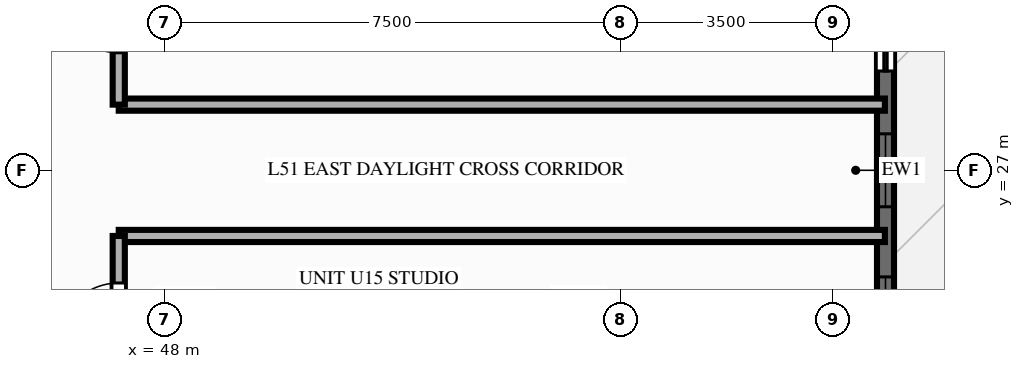
"""IFC4 building model, lengths in metres.
Left out: names, types, materials, properties, quantities, classifications, styles, units other than length and angle.
Written with IfcOpenShell. Run it as: python <this file> out.ifc"""

import sys

from ifc_helpers import new_model, si_unit, direction, frame, frame_2d, origin, place, context, subcontext, project, spatial, rectangle, extrude, source, transform, mapped, element, fill, save


model = new_model("IFC4")
c1 = context("Model", 3, precision=1e-05, world=origin(), true_north=direction((0.0, 1.0)))
c2 = subcontext(c1, "Body", "Model", "MODEL_VIEW")
j1 = project(units=[si_unit("LENGTHUNIT", "METRE"), si_unit("PLANEANGLEUNIT", "RADIAN")], contexts=[c1])
p1 = place(None, origin())
s1 = spatial("IfcSite", under=j1, at=p1, CompositionType="ELEMENT")
p2 = place(p1, origin())
s2 = spatial("IfcBuilding", under=s1, at=p2, CompositionType="ELEMENT")
p3 = place(p2, frame((0.0, 0.0, 163.0)))
s3 = spatial("IfcBuildingStorey", under=s2, at=p3, CompositionType="ELEMENT", Elevation=163.0)
p4 = place(p3, frame((59.86, 11.0, 0.0), z_axis=(0.0, 0.0, 1.0), x_axis=(0.0, 1.0, 0.0)))
e1 = element("IfcWall", 1, at=p4, inside=s3, PredefinedType="SOLIDWALL", context=c2, shape_type="SweptSolid", body=[
    extrude(rectangle(XDim=32.0, YDim=0.28, at=frame_2d((16.0, 0.0))), origin(), (0.0, 0.0, 1.0), 2.28),
])
p5 = place(p4, frame((1.04, 0.0, 0.25)))
e2 = element("IfcOpeningElement", 2, at=p5, cuts=e1, PredefinedType="OPENING", context=c2, shape_type="SweptSolid", body=[
    extrude(rectangle(XDim=1.2, YDim=1.5, at=frame_2d((0.6, 0.75))), frame((0.0, 0.152, 0.0), z_axis=(0.0, -1.0, 0.0), x_axis=(1.0, 0.0, 0.0)), (0.0, 0.0, 1.0), 0.304),
])
p6 = place(p4, frame((3.552, 0.0, 0.25)))
e3 = element("IfcOpeningElement", 3, at=p6, cuts=e1, PredefinedType="OPENING", context=c2, shape_type="SweptSolid", body=[
    extrude(rectangle(XDim=1.2, YDim=1.5, at=frame_2d((0.6, 0.75))), frame((0.0, 0.152, 0.0), z_axis=(0.0, -1.0, 0.0), x_axis=(1.0, 0.0, 0.0)), (0.0, 0.0, 1.0), 0.304),
])
p7 = place(p4, frame((5.662, 0.0, 0.25)))
e4 = element("IfcOpeningElement", 4, at=p7, cuts=e1, PredefinedType="OPENING", context=c2, shape_type="SweptSolid", body=[
    extrude(rectangle(XDim=0.7, YDim=1.5, at=frame_2d((0.35, 0.75))), frame((0.0, 0.152, 0.0), z_axis=(0.0, -1.0, 0.0), x_axis=(1.0, 0.0, 0.0)), (0.0, 0.0, 1.0), 0.304),
])
p8 = place(p4, frame((8.29, 0.0, 0.25)))
e5 = element("IfcOpeningElement", 5, at=p8, cuts=e1, PredefinedType="OPENING", context=c2, shape_type="SweptSolid", body=[
    extrude(rectangle(XDim=1.2, YDim=1.5, at=frame_2d((0.6, 0.75))), frame((0.0, 0.152, 0.0), z_axis=(0.0, -1.0, 0.0), x_axis=(1.0, 0.0, 0.0)), (0.0, 0.0, 1.0), 0.304),
])
p9 = place(p4, frame((10.688, 0.0, 0.25)))
e6 = element("IfcOpeningElement", 6, at=p9, cuts=e1, PredefinedType="OPENING", context=c2, shape_type="SweptSolid", body=[
    extrude(rectangle(XDim=1.2, YDim=1.5, at=frame_2d((0.6, 0.75))), frame((0.0, 0.152, 0.0), z_axis=(0.0, -1.0, 0.0), x_axis=(1.0, 0.0, 0.0)), (0.0, 0.0, 1.0), 0.304),
])
p10 = place(p4, frame((13.046, 0.0, 0.25)))
e7 = element("IfcOpeningElement", 7, at=p10, cuts=e1, PredefinedType="OPENING", context=c2, shape_type="SweptSolid", body=[
    extrude(rectangle(XDim=1.2, YDim=1.5, at=frame_2d((0.6, 0.75))), frame((0.0, 0.152, 0.0), z_axis=(0.0, -1.0, 0.0), x_axis=(1.0, 0.0, 0.0)), (0.0, 0.0, 1.0), 0.304),
])
p11 = place(p4, frame((15.4, 0.0, 0.25)))
e8 = element("IfcOpeningElement", 8, at=p11, cuts=e1, PredefinedType="OPENING", context=c2, shape_type="SweptSolid", body=[
    extrude(rectangle(XDim=1.2, YDim=1.5, at=frame_2d((0.6, 0.75))), frame((0.0, 0.152, 0.0), z_axis=(0.0, -1.0, 0.0), x_axis=(1.0, 0.0, 0.0)), (0.0, 0.0, 1.0), 0.304),
])
p12 = place(p4, frame((19.233, 0.0, 0.0), z_axis=(0.0, 0.0, 1.0), x_axis=(-1.0, 0.0, 0.0)))
e9 = element("IfcOpeningElement", 9, at=p12, cuts=e1, PredefinedType="OPENING", context=c2, shape_type="SweptSolid", body=[
    extrude(rectangle(XDim=1.6, YDim=2.15, at=frame_2d((0.8, 1.075))), frame((0.0, 0.152, 0.0), z_axis=(0.0, -1.0, 0.0), x_axis=(1.0, 0.0, 0.0)), (0.0, 0.0, 1.0), 0.304),
])
p13 = place(p4, frame((20.339, 0.0, 0.25)))
e10 = element("IfcOpeningElement", 10, at=p13, cuts=e1, PredefinedType="OPENING", context=c2, shape_type="SweptSolid", body=[
    extrude(rectangle(XDim=1.2, YDim=1.5, at=frame_2d((0.6, 0.75))), frame((0.0, 0.152, 0.0), z_axis=(0.0, -1.0, 0.0), x_axis=(1.0, 0.0, 0.0)), (0.0, 0.0, 1.0), 0.304),
])
p14 = place(p4, frame((22.788, 0.0, 0.25)))
e11 = element("IfcOpeningElement", 11, at=p14, cuts=e1, PredefinedType="OPENING", context=c2, shape_type="SweptSolid", body=[
    extrude(rectangle(XDim=1.2, YDim=1.5, at=frame_2d((0.6, 0.75))), frame((0.0, 0.152, 0.0), z_axis=(0.0, -1.0, 0.0), x_axis=(1.0, 0.0, 0.0)), (0.0, 0.0, 1.0), 0.304),
])
p15 = place(p4, frame((25.66, 0.0, 0.25)))
e12 = element("IfcOpeningElement", 12, at=p15, cuts=e1, PredefinedType="OPENING", context=c2, shape_type="SweptSolid", body=[
    extrude(rectangle(XDim=0.95, YDim=1.5, at=frame_2d((0.475, 0.75))), frame((0.0, 0.152, 0.0), z_axis=(0.0, -1.0, 0.0), x_axis=(1.0, 0.0, 0.0)), (0.0, 0.0, 1.0), 0.304),
])
p16 = place(p4, frame((27.475, 0.0, 0.25)))
e13 = element("IfcOpeningElement", 13, at=p16, cuts=e1, PredefinedType="OPENING", context=c2, shape_type="SweptSolid", body=[
    extrude(rectangle(XDim=1.2, YDim=1.5, at=frame_2d((0.6, 0.75))), frame((0.0, 0.152, 0.0), z_axis=(0.0, -1.0, 0.0), x_axis=(1.0, 0.0, 0.0)), (0.0, 0.0, 1.0), 0.304),
])
p17 = place(p4, frame((29.839, 0.0, 0.25)))
e14 = element("IfcOpeningElement", 14, at=p17, cuts=e1, PredefinedType="OPENING", context=c2, shape_type="SweptSolid", body=[
    extrude(rectangle(XDim=1.2, YDim=1.5, at=frame_2d((0.6, 0.75))), frame((0.0, 0.152, 0.0), z_axis=(0.0, -1.0, 0.0), x_axis=(1.0, 0.0, 0.0)), (0.0, 0.0, 1.0), 0.304),
])
p18 = place(p3, frame((47.25, 25.92, 0.0), z_axis=(0.0, 0.0, 1.0), x_axis=(1.0, 0.0, 0.0)))
e15 = element("IfcWall", 15, at=p18, inside=s3, PredefinedType="PARTITIONING", context=c2, shape_type="SweptSolid", body=[
    extrude(rectangle(XDim=12.6, YDim=0.2, at=frame_2d((6.3, 0.0))), origin(), (0.0, 0.0, 1.0), 2.79),
])
p19 = place(p3, frame((47.25, 23.373, 0.0), z_axis=(0.0, 0.0, 1.0), x_axis=(0.0, 1.0, 0.0)))
e16 = element("IfcWall", 16, at=p19, inside=s3, PredefinedType="PARTITIONING", context=c2, shape_type="SweptSolid", body=[
    extrude(rectangle(XDim=2.547, YDim=0.2, at=frame_2d((1.273, 0.0))), origin(), (0.0, 0.0, 1.0), 2.79),
])
p20 = place(p19, frame((0.774, 0.0, 0.0)))
e17 = element("IfcOpeningElement", 17, at=p20, cuts=e16, PredefinedType="OPENING", context=c2, shape_type="SweptSolid", body=[
    extrude(rectangle(XDim=1.0, YDim=2.15, at=frame_2d((0.5, 1.075))), frame((0.0, 0.112, 0.0), z_axis=(0.0, -1.0, 0.0), x_axis=(1.0, 0.0, 0.0)), (0.0, 0.0, 1.0), 0.224),
])
p21 = place(p3, frame((47.25, 28.08, 0.0), z_axis=(0.0, 0.0, 1.0), x_axis=(1.0, 0.0, 0.0)))
e18 = element("IfcWall", 18, at=p21, inside=s3, PredefinedType="PARTITIONING", context=c2, shape_type="SweptSolid", body=[
    extrude(rectangle(XDim=12.6, YDim=0.2, at=frame_2d((6.3, 0.0))), origin(), (0.0, 0.0, 1.0), 2.79),
])
p22 = place(p3, frame((47.25, 28.08, 0.0), z_axis=(0.0, 0.0, 1.0), x_axis=(0.0, 1.0, 0.0)))
e19 = element("IfcWall", 19, at=p22, inside=s3, PredefinedType="PARTITIONING", context=c2, shape_type="SweptSolid", body=[
    extrude(rectangle(XDim=2.706, YDim=0.2, at=frame_2d((1.353, 0.0))), origin(), (0.0, 0.0, 1.0), 2.79),
])
p23 = place(p22, frame((0.853, 0.0, 0.0)))
e20 = element("IfcOpeningElement", 20, at=p23, cuts=e19, PredefinedType="OPENING", context=c2, shape_type="SweptSolid", body=[
    extrude(rectangle(XDim=1.0, YDim=2.15, at=frame_2d((0.5, 1.075))), frame((0.0, 0.112, 0.0), z_axis=(0.0, -1.0, 0.0), x_axis=(1.0, 0.0, 0.0)), (0.0, 0.0, 1.0), 0.224),
])
m1 = source(origin(), c2, "Body", "SweptSolid", [
    extrude(rectangle(XDim=1.2, YDim=1.5, at=frame_2d((0.6, 0.75))), frame((0.0, 0.03, 0.0), z_axis=(0.0, -1.0, 0.0), x_axis=(1.0, 0.0, 0.0)), (0.0, 0.0, 1.0), 0.06),
])
p24 = place(p10, origin())
e21 = element("IfcWindow", 21, at=p24, inside=s3, PartitioningType="SINGLE_PANEL", PredefinedType="WINDOW", context=c2, shape_type="MappedRepresentation", body=[
    mapped(m1, transform((0.0, 0.0, 0.0), scale=1.0)),
])
fill(e7, e21)
p25 = place(p11, origin())
e22 = element("IfcWindow", 22, at=p25, inside=s3, PartitioningType="SINGLE_PANEL", PredefinedType="WINDOW", context=c2, shape_type="MappedRepresentation", body=[
    mapped(m1, transform((0.0, 0.0, 0.0), scale=1.0)),
])
fill(e8, e22)
m2 = source(origin(), c2, "Body", "SweptSolid", [
    extrude(rectangle(XDim=1.6, YDim=2.15, at=frame_2d((0.8, 1.075))), frame((0.0, 0.025, 0.0), z_axis=(0.0, -1.0, 0.0), x_axis=(1.0, 0.0, 0.0)), (0.0, 0.0, 1.0), 0.05),
])
p26 = place(p12, origin())
e23 = element("IfcDoor", 23, at=p26, inside=s3, OperationType="SLIDING_TO_LEFT", PredefinedType="DOOR", context=c2, shape_type="MappedRepresentation", body=[
    mapped(m2, transform((0.0, 0.0, 0.0), scale=1.0)),
])
fill(e9, e23)
m3 = source(origin(), c2, "Body", "SweptSolid", [
    extrude(rectangle(XDim=1.0, YDim=2.15, at=frame_2d((0.5, 1.075))), frame((0.0, 0.025, 0.0), z_axis=(0.0, -1.0, 0.0), x_axis=(1.0, 0.0, 0.0)), (0.0, 0.0, 1.0), 0.05),
])
p27 = place(p20, origin())
e24 = element("IfcDoor", 24, at=p27, inside=s3, OperationType="SINGLE_SWING_LEFT", PredefinedType="DOOR", context=c2, shape_type="MappedRepresentation", body=[
    mapped(m3, transform((0.0, 0.0, 0.0), scale=1.0)),
])
fill(e17, e24)
p28 = place(p23, origin())
e25 = element("IfcDoor", 25, at=p28, inside=s3, OperationType="SINGLE_SWING_RIGHT", PredefinedType="DOOR", context=c2, shape_type="MappedRepresentation", body=[
    mapped(m3, transform((0.0, 0.0, 0.0), scale=1.0)),
])
fill(e20, e25)
save(model, sys.argv[1])
